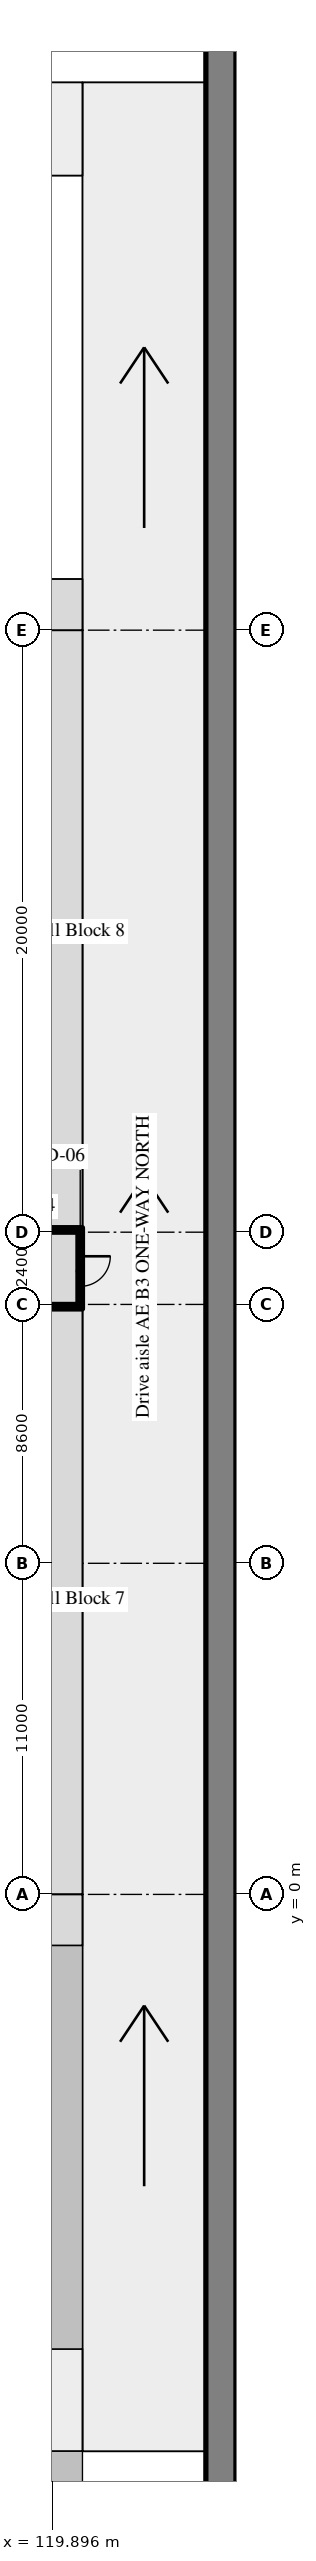
"""IFC4 building model, lengths in metres.
Left out: names, types, materials, properties, quantities, classifications, styles, units other than length and angle.
Written with IfcOpenShell. Run it as: python <this file> out.ifc"""

import sys

from ifc_helpers import new_model, si_unit, direction, frame, frame_2d, origin, place, context, subcontext, project, spatial, rectangle, extrude, source, transform, mapped, element, fill, save


model = new_model("IFC4")
c1 = context("Model", 3, precision=1e-05, world=origin(), true_north=direction((0.0, 1.0)))
c2 = subcontext(c1, "Body", "Model", "MODEL_VIEW")
j1 = project(units=[si_unit("LENGTHUNIT", "METRE"), si_unit("PLANEANGLEUNIT", "RADIAN")], contexts=[c1])
p1 = place(None, origin())
s1 = spatial("IfcSite", under=j1, at=p1, CompositionType="ELEMENT")
p2 = place(p1, origin())
s2 = spatial("IfcBuilding", under=s1, at=p2, CompositionType="ELEMENT")
p3 = place(p2, frame((0.0, 0.0, -13.5)))
s3 = spatial("IfcBuildingStorey", under=s2, at=p3, CompositionType="ELEMENT", Elevation=-13.5)
m1 = source(origin(), c2, "Body", "SweptSolid", [
    extrude(rectangle(XDim=98.8, YDim=1.0, at=frame_2d((49.4, 0.0))), origin(), (0.0, 0.0, 1.0), 4.52),
])
p4 = place(p3, frame((125.5, -32.6, -0.3), z_axis=(0.0, 0.0, 1.0), x_axis=(0.0, 1.0, 0.0)))
e1 = element("IfcWall", 1, at=p4, inside=s3, PredefinedType="SHEAR", context=c2, shape_type="MappedRepresentation", body=[
    mapped(m1, transform((0.0, 0.0, 0.0), scale=1.0)),
])
m2 = source(origin(), c2, "Body", "SweptSolid", [
    extrude(rectangle(XDim=20.1, YDim=0.15, at=frame_2d((10.05, 0.0))), origin(), (0.0, 0.0, 1.0), 4.22),
])
p5 = place(p3, frame((100.8, 19.525, 0.0), z_axis=(0.0, 0.0, 1.0), x_axis=(1.0, 0.0, 0.0)))
e2 = element("IfcWall", 2, at=p5, inside=s3, PredefinedType="PARTITIONING", context=c2, shape_type="MappedRepresentation", body=[
    mapped(m2, transform((0.0, 0.0, 0.0), scale=1.0)),
])
m3 = source(origin(), c2, "Body", "SweptSolid", [
    extrude(rectangle(XDim=1.0, YDim=2.1, at=frame_2d((0.5, 1.05))), frame((0.0, 0.085, 0.0), z_axis=(0.0, -1.0, 0.0), x_axis=(1.0, 0.0, 0.0)), (0.0, 0.0, 1.0), 0.17),
])
p6 = place(p5, frame((17.4, 0.0, 0.0)))
e3 = element("IfcOpeningElement", 3, at=p6, cuts=e2, PredefinedType="OPENING", context=c2, shape_type="MappedRepresentation", body=[
    mapped(m3, transform((0.0, 0.0, 0.0), scale=1.0)),
])
p7 = place(p3, frame((100.8, 22.075, 0.0), z_axis=(0.0, 0.0, 1.0), x_axis=(1.0, 0.0, 0.0)))
e4 = element("IfcWall", 4, at=p7, inside=s3, PredefinedType="PARTITIONING", context=c2, shape_type="MappedRepresentation", body=[
    mapped(m2, transform((0.0, 0.0, 0.0), scale=1.0)),
])
p8 = place(p7, frame((17.4, 0.0, 0.0)))
e5 = element("IfcOpeningElement", 5, at=p8, cuts=e4, PredefinedType="OPENING", context=c2, shape_type="MappedRepresentation", body=[
    mapped(m3, transform((0.0, 0.0, 0.0), scale=1.0)),
])
m4 = source(origin(), c2, "Body", "SweptSolid", [
    extrude(rectangle(XDim=2.4, YDim=0.15, at=frame_2d((1.2, 0.0))), origin(), (0.0, 0.0, 1.0), 4.22),
])
p9 = place(p3, frame((120.825, 19.6, 0.0), z_axis=(0.0, 0.0, 1.0), x_axis=(0.0, 1.0, 0.0)))
e6 = element("IfcWall", 6, at=p9, inside=s3, PredefinedType="PARTITIONING", context=c2, shape_type="MappedRepresentation", body=[
    mapped(m4, transform((0.0, 0.0, 0.0), scale=1.0)),
])
p10 = place(p9, frame((0.6, 0.0, 0.0)))
e7 = element("IfcOpeningElement", 7, at=p10, cuts=e6, PredefinedType="OPENING", context=c2, shape_type="MappedRepresentation", body=[
    mapped(m3, transform((0.0, 0.0, 0.0), scale=1.0)),
])
m5 = source(origin(), c2, "Body", "SweptSolid", [
    extrude(rectangle(XDim=1.0, YDim=2.1, at=frame_2d((0.5, 1.05))), frame((0.0, 0.025, 0.0), z_axis=(0.0, -1.0, 0.0), x_axis=(1.0, 0.0, 0.0)), (0.0, 0.0, 1.0), 0.05),
])
p11 = place(p10, origin())
e8 = element("IfcDoor", 8, at=p11, inside=s3, OperationType="SINGLE_SWING_RIGHT", PredefinedType="DOOR", context=c2, shape_type="MappedRepresentation", body=[
    mapped(m5, transform((0.0, 0.0, 0.0), scale=1.0)),
])
fill(e7, e8)
save(model, sys.argv[1])
